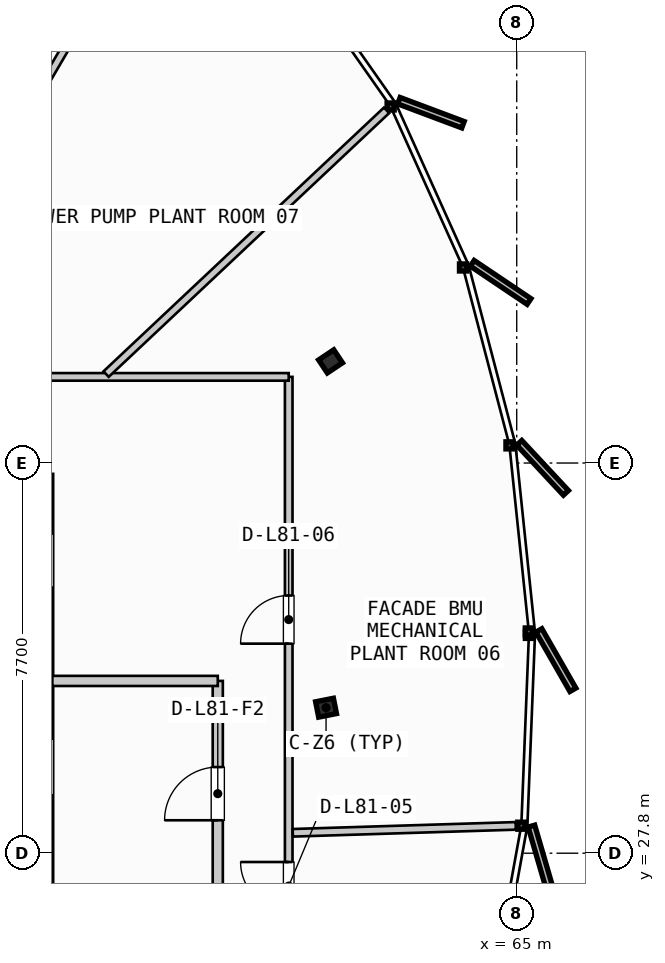
"""IFC4 building model, lengths in metres.
Left out: names, types, materials, properties, quantities, classifications, styles, units other than length and angle.
Written with IfcOpenShell. Run it as: python <this file> out.ifc"""

import sys

from ifc_helpers import new_model, si_unit, direction, frame, frame_2d, origin, origin_2d, place, context, subcontext, project, spatial, rectangle, i_section, extrude, source, transform, mapped, element, fill, save


model = new_model("IFC4")
c1 = context("Model", 3, precision=1e-05, world=origin(), true_north=direction((0.0, 1.0)))
c2 = subcontext(c1, "Body", "Model", "MODEL_VIEW")
j1 = project(units=[si_unit("LENGTHUNIT", "METRE"), si_unit("PLANEANGLEUNIT", "RADIAN")], contexts=[c1])
p1 = place(None, origin())
s1 = spatial("IfcSite", under=j1, at=p1, CompositionType="ELEMENT")
p2 = place(p1, origin())
s2 = spatial("IfcBuilding", under=s1, at=p2, CompositionType="ELEMENT")
p3 = place(p2, frame((0.0, 0.0, 304.3)))
s3 = spatial("IfcBuildingStorey", under=s2, at=p3, CompositionType="ELEMENT", Elevation=304.3)
m1 = source(origin(), c2, "Body", "SweptSolid", [
    extrude(i_section(OverallWidth=0.309, OverallDepth=0.359, WebThickness=0.016, FlangeThickness=0.026, FilletRadius=0.027, at=origin_2d()), origin(), (0.0, 0.0, 1.0), 3.735),
])
for number, where, z_axis, x_axis in (
    (1, (61.237, 30.672, 0.0), (0.0, 0.0, 1.0), (0.981, 0.195, 0.0)),
    (2, (61.326, 37.506, 0.0), (0.0, 0.0, 1.0), (0.831, 0.556, 0.0)),
):
    element("IfcColumn", number, at=place(p3, frame(where, z_axis=z_axis, x_axis=x_axis)), inside=s3, PredefinedType="COLUMN", context=c2, shape_type="MappedRepresentation", body=[
        mapped(m1, transform((0.0, 0.0, 0.0), scale=1.0)),
    ])
p4 = place(p3, frame((59.1, 26.8, 0.0), z_axis=(0.0, 0.0, 1.0), x_axis=(0.0, 1.0, 0.0)))
e3 = element("IfcWall", 3, at=p4, inside=s3, PredefinedType="PARTITIONING", context=c2, shape_type="SweptSolid", body=[
    extrude(rectangle(XDim=4.4, YDim=0.2, at=frame_2d((2.2, 0.0))), origin(), (0.0, 0.0, 1.0), 3.26),
])
p5 = place(p4, frame((1.65, 0.0, 0.0)))
e4 = element("IfcOpeningElement", 4, at=p5, cuts=e3, PredefinedType="OPENING", context=c2, shape_type="SweptSolid", body=[
    extrude(rectangle(XDim=1.05, YDim=2.15, at=frame_2d((0.525, 1.075))), frame((0.0, 0.11, 0.0), z_axis=(0.0, -1.0, 0.0), x_axis=(1.0, 0.0, 0.0)), (0.0, 0.0, 1.0), 0.22),
])
p6 = place(p3, frame((55.835, 31.2, 0.0), z_axis=(0.0, 0.0, 1.0), x_axis=(1.0, 0.0, 0.0)))
e5 = element("IfcWall", 5, at=p6, inside=s3, PredefinedType="PARTITIONING", context=c2, shape_type="SweptSolid", body=[
    extrude(rectangle(XDim=3.265, YDim=0.2, at=frame_2d((1.633, 0.0))), origin(), (0.0, 0.0, 1.0), 3.26),
])
p7 = place(p3, frame((60.5, 18.4, 0.0), z_axis=(0.0, 0.0, 1.0), x_axis=(0.0, 1.0, 0.0)))
e6 = element("IfcWall", 6, at=p7, inside=s3, PredefinedType="PARTITIONING", context=c2, shape_type="SweptSolid", body=[
    extrude(rectangle(XDim=18.8, YDim=0.15, at=frame_2d((9.4, 0.0))), origin(), (0.0, 0.0, 1.0), 3.26),
])
p8 = place(p7, frame((8.276, 0.0, 0.0)))
e7 = element("IfcOpeningElement", 7, at=p8, cuts=e6, PredefinedType="OPENING", context=c2, shape_type="SweptSolid", body=[
    extrude(rectangle(XDim=0.95, YDim=2.15, at=frame_2d((0.475, 1.075))), frame((0.0, 0.085, 0.0), z_axis=(0.0, -1.0, 0.0), x_axis=(1.0, 0.0, 0.0)), (0.0, 0.0, 1.0), 0.17),
])
p9 = place(p7, frame((13.535, 0.0, 0.0)))
e8 = element("IfcOpeningElement", 8, at=p9, cuts=e6, PredefinedType="OPENING", context=c2, shape_type="SweptSolid", body=[
    extrude(rectangle(XDim=0.95, YDim=2.15, at=frame_2d((0.475, 1.075))), frame((0.0, 0.085, 0.0), z_axis=(0.0, -1.0, 0.0), x_axis=(1.0, 0.0, 0.0)), (0.0, 0.0, 1.0), 0.17),
])
p10 = place(p3, frame((60.5, 37.2, 0.0), z_axis=(0.0, 0.0, 1.0), x_axis=(-1.0, 0.0, 0.0)))
e9 = element("IfcWall", 9, at=p10, inside=s3, PredefinedType="PARTITIONING", context=c2, shape_type="SweptSolid", body=[
    extrude(rectangle(XDim=27.4, YDim=0.15, at=frame_2d((13.7, 0.0))), origin(), (0.0, 0.0, 1.0), 3.26),
])
p11 = place(p10, frame((5.393, 0.0, 0.0)))
e10 = element("IfcOpeningElement", 10, at=p11, cuts=e9, PredefinedType="OPENING", context=c2, shape_type="SweptSolid", body=[
    extrude(rectangle(XDim=0.95, YDim=2.15, at=frame_2d((0.475, 1.075))), frame((0.0, 0.085, 0.0), z_axis=(0.0, -1.0, 0.0), x_axis=(1.0, 0.0, 0.0)), (0.0, 0.0, 1.0), 0.17),
])
p12 = place(p10, frame((12.272, 0.0, 0.0)))
e11 = element("IfcOpeningElement", 11, at=p12, cuts=e9, PredefinedType="OPENING", context=c2, shape_type="SweptSolid", body=[
    extrude(rectangle(XDim=0.95, YDim=2.15, at=frame_2d((0.475, 1.075))), frame((0.0, 0.085, 0.0), z_axis=(0.0, -1.0, 0.0), x_axis=(1.0, 0.0, 0.0)), (0.0, 0.0, 1.0), 0.17),
])
p13 = place(p10, frame((21.592, 0.0, 0.0)))
e12 = element("IfcOpeningElement", 12, at=p13, cuts=e9, PredefinedType="OPENING", context=c2, shape_type="SweptSolid", body=[
    extrude(rectangle(XDim=0.95, YDim=2.15, at=frame_2d((0.475, 1.075))), frame((0.0, 0.085, 0.0), z_axis=(0.0, -1.0, 0.0), x_axis=(1.0, 0.0, 0.0)), (0.0, 0.0, 1.0), 0.17),
])
p14 = place(p3, frame((60.58, 28.203, 0.0), z_axis=(0.0, 0.0, 1.0), x_axis=(0.999517686505, 0.031054699536, 0.0)))
e13 = element("IfcWall", 13, at=p14, inside=s3, PredefinedType="PARTITIONING", context=c2, shape_type="SweptSolid", body=[
    extrude(rectangle(XDim=4.403, YDim=0.15, at=frame_2d((2.201, 0.0))), origin(), (0.0, 0.0, 1.0), 3.26),
])
p15 = place(p3, frame((56.896, 37.255, 0.0), z_axis=(0.0, 0.0, 1.0), x_axis=(0.728447090506, 0.685102062713, 0.0)))
e14 = element("IfcWall", 14, at=p15, inside=s3, PredefinedType="PARTITIONING", context=c2, shape_type="SweptSolid", body=[
    extrude(rectangle(XDim=7.598, YDim=0.15, at=frame_2d((3.799, 0.0))), origin(), (0.0, 0.0, 1.0), 3.26),
])
p16 = place(p3, frame((52.336, 37.269, 0.0), z_axis=(0.0, 0.0, 1.0), x_axis=(0.504823212325, 0.863222754738, 0.0)))
e15 = element("IfcWall", 15, at=p16, inside=s3, PredefinedType="PARTITIONING", context=c2, shape_type="SweptSolid", body=[
    extrude(rectangle(XDim=11.65, YDim=0.15, at=frame_2d((5.825, 0.0))), origin(), (0.0, 0.0, 1.0), 3.26),
])
m2 = source(origin(), c2, "Body", "SweptSolid", [
    extrude(rectangle(XDim=1.05, YDim=2.15, at=frame_2d((0.525, 1.075))), frame((0.0, 0.025, 0.0), z_axis=(0.0, -1.0, 0.0), x_axis=(1.0, 0.0, 0.0)), (0.0, 0.0, 1.0), 0.05),
])
p17 = place(p5, origin())
e16 = element("IfcDoor", 16, at=p17, inside=s3, OperationType="SINGLE_SWING_LEFT", PredefinedType="DOOR", context=c2, shape_type="MappedRepresentation", body=[
    mapped(m2, transform((0.0, 0.0, 0.0), scale=1.0)),
])
fill(e4, e16)
m3 = source(origin(), c2, "Body", "SweptSolid", [
    extrude(rectangle(XDim=0.95, YDim=2.15, at=frame_2d((0.475, 1.075))), frame((0.0, 0.025, 0.0), z_axis=(0.0, -1.0, 0.0), x_axis=(1.0, 0.0, 0.0)), (0.0, 0.0, 1.0), 0.05),
])
p18 = place(p8, origin())
e17 = element("IfcDoor", 17, at=p18, inside=s3, OperationType="SINGLE_SWING_RIGHT", PredefinedType="DOOR", context=c2, shape_type="MappedRepresentation", body=[
    mapped(m3, transform((0.0, 0.0, 0.0), scale=1.0)),
])
fill(e7, e17)
p19 = place(p9, origin())
e18 = element("IfcDoor", 18, at=p19, inside=s3, OperationType="SINGLE_SWING_LEFT", PredefinedType="DOOR", context=c2, shape_type="MappedRepresentation", body=[
    mapped(m3, transform((0.0, 0.0, 0.0), scale=1.0)),
])
fill(e8, e18)
save(model, sys.argv[1])
